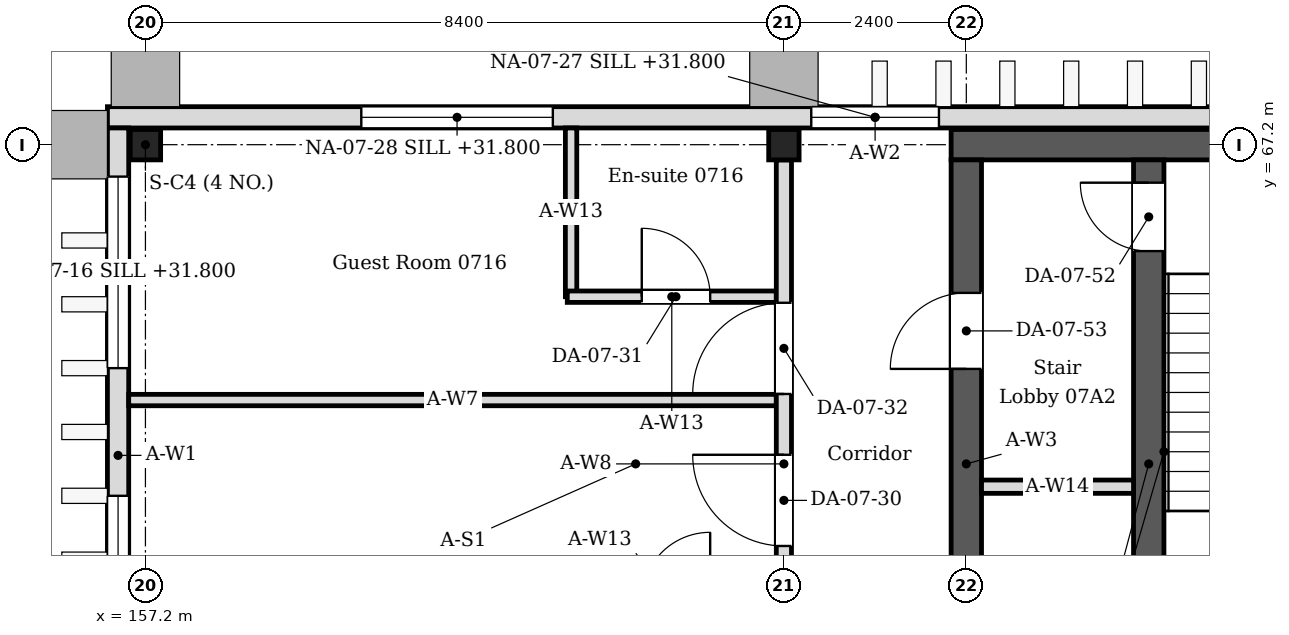
"""IFC4 building model, lengths in metres.
Left out: names, types, materials, properties, quantities, classifications, styles, units other than length and angle.
Written with IfcOpenShell. Run it as: python <this file> out.ifc"""

import sys

from ifc_helpers import new_model, si_unit, direction, frame, frame_2d, origin, origin_2d, place, context, subcontext, project, spatial, rectangle, i_section, extrude, element, fill, save


model = new_model("IFC4")
c1 = context("Model", 3, precision=1e-05, world=origin(), true_north=direction((0.0, 1.0)))
c2 = subcontext(c1, "Body", "Model", "MODEL_VIEW")
j1 = project(units=[si_unit("LENGTHUNIT", "METRE"), si_unit("PLANEANGLEUNIT", "RADIAN")], contexts=[c1])
p1 = place(None, origin())
s1 = spatial("IfcSite", under=j1, at=p1, CompositionType="ELEMENT")
p2 = place(p1, origin())
s2 = spatial("IfcBuilding", under=s1, at=p2, CompositionType="ELEMENT")
p3 = place(p2, frame((0.0, 0.0, 31.2)))
s3 = spatial("IfcBuildingStorey", under=s2, at=p3, CompositionType="ELEMENT", Elevation=31.2)
for number, where, z_axis, x_axis in (
    (1, (157.2, 67.2, 0.0), (0.0, 0.0, 1.0), (1.0, 0.0, 0.0)),
    (2, (165.6, 67.2, 0.0), (0.0, 0.0, 1.0), (1.0, 0.0, 0.0)),
):
    element("IfcColumn", number, at=place(p3, frame(where, z_axis=z_axis, x_axis=x_axis)), inside=s3, PredefinedType="COLUMN", context=c2, shape_type="SweptSolid", body=[
        extrude(i_section(OverallWidth=0.4, OverallDepth=0.4, WebThickness=0.013, FlangeThickness=0.021, FilletRadius=0.022, at=origin_2d()), origin(), (0.0, 0.0, 1.0), 4.2),
    ])
p4 = place(p3, frame((167.8, 67.2, 0.0), z_axis=(0.0, 0.0, 1.0), x_axis=(1.0, 0.0, 0.0)))
e3 = element("IfcWall", 3, at=p4, inside=s3, PredefinedType="SOLIDWALL", context=c2, shape_type="SweptSolid", body=[
    extrude(rectangle(XDim=8.8, YDim=0.4, at=frame_2d((4.4, 0.0))), origin(), (0.0, 0.0, 1.0), 4.05),
])
p5 = place(p3, frame((168.0, 59.0, 0.0), z_axis=(0.0, 0.0, 1.0), x_axis=(0.0, 1.0, 0.0)))
e4 = element("IfcWall", 4, at=p5, inside=s3, PredefinedType="SOLIDWALL", context=c2, shape_type="SweptSolid", body=[
    extrude(rectangle(XDim=8.0, YDim=0.4, at=frame_2d((4.0, 0.0))), origin(), (0.0, 0.0, 1.0), 4.05),
])
p6 = place(p5, frame((5.25, 0.0, 0.0)))
e5 = element("IfcOpeningElement", 5, at=p6, cuts=e4, PredefinedType="OPENING", context=c2, shape_type="SweptSolid", body=[
    extrude(rectangle(XDim=1.0, YDim=2.1, at=frame_2d((0.5, 1.05))), frame((0.0, 0.21, 0.0), z_axis=(0.0, -1.0, 0.0), x_axis=(1.0, 0.0, 0.0)), (0.0, 0.0, 1.0), 0.42),
])
p7 = place(p5, frame((1.275, 0.0, 0.0)))
e6 = element("IfcOpeningElement", 6, at=p7, cuts=e4, PredefinedType="OPENING", context=c2, shape_type="SweptSolid", body=[
    extrude(rectangle(XDim=1.05, YDim=2.1, at=frame_2d((0.525, 1.05))), frame((0.0, 0.21, 0.0), z_axis=(0.0, -1.0, 0.0), x_axis=(1.0, 0.0, 0.0)), (0.0, 0.0, 1.0), 0.42),
])
p8 = place(p3, frame((156.84, 58.45, 0.0), z_axis=(0.0, 0.0, 1.0), x_axis=(0.0, 1.0, 0.0)))
e7 = element("IfcWall", 7, at=p8, inside=s3, PredefinedType="SOLIDWALL", context=c2, shape_type="SweptSolid", body=[
    extrude(rectangle(XDim=8.97, YDim=0.28, at=frame_2d((4.485, 0.0))), origin(), (0.0, 0.0, 1.0), 4.05),
])
p9 = place(p8, frame((1.61, 0.0, 0.6)))
e8 = element("IfcOpeningElement", 8, at=p9, cuts=e7, PredefinedType="OPENING", context=c2, shape_type="SweptSolid", body=[
    extrude(rectangle(XDim=2.52, YDim=2.4, at=frame_2d((1.26, 1.2))), frame((0.0, 0.15, 0.0), z_axis=(0.0, -1.0, 0.0), x_axis=(1.0, 0.0, 0.0)), (0.0, 0.0, 1.0), 0.3),
])
p10 = place(p8, frame((5.81, 0.0, 0.6)))
e9 = element("IfcOpeningElement", 9, at=p10, cuts=e7, PredefinedType="OPENING", context=c2, shape_type="SweptSolid", body=[
    extrude(rectangle(XDim=2.52, YDim=2.4, at=frame_2d((1.26, 1.2))), frame((0.0, 0.15, 0.0), z_axis=(0.0, -1.0, 0.0), x_axis=(1.0, 0.0, 0.0)), (0.0, 0.0, 1.0), 0.3),
])
p11 = place(p3, frame((156.7, 67.56, 0.0), z_axis=(0.0, 0.0, 1.0), x_axis=(1.0, 0.0, 0.0)))
e10 = element("IfcWall", 10, at=p11, inside=s3, PredefinedType="SOLIDWALL", context=c2, shape_type="SweptSolid", body=[
    extrude(rectangle(XDim=20.2, YDim=0.28, at=frame_2d((10.1, 0.0))), origin(), (0.0, 0.0, 1.0), 4.05),
])
p12 = place(p11, frame((9.26, 0.0, 0.6)))
e11 = element("IfcOpeningElement", 11, at=p12, cuts=e10, PredefinedType="OPENING", context=c2, shape_type="SweptSolid", body=[
    extrude(rectangle(XDim=1.68, YDim=2.4, at=frame_2d((0.84, 1.2))), frame((0.0, 0.15, 0.0), z_axis=(0.0, -1.0, 0.0), x_axis=(1.0, 0.0, 0.0)), (0.0, 0.0, 1.0), 0.3),
])
p13 = place(p11, frame((3.34, 0.0, 0.6)))
e12 = element("IfcOpeningElement", 12, at=p13, cuts=e10, PredefinedType="OPENING", context=c2, shape_type="SweptSolid", body=[
    extrude(rectangle(XDim=2.52, YDim=2.4, at=frame_2d((1.26, 1.2))), frame((0.0, 0.15, 0.0), z_axis=(0.0, -1.0, 0.0), x_axis=(1.0, 0.0, 0.0)), (0.0, 0.0, 1.0), 0.3),
])
p14 = place(p3, frame((162.8, 65.2, 0.0), z_axis=(0.0, 0.0, 1.0), x_axis=(0.0, 1.0, 0.0)))
e13 = element("IfcWall", 13, at=p14, inside=s3, PredefinedType="PARTITIONING", context=c2, shape_type="SweptSolid", body=[
    extrude(rectangle(XDim=2.22, YDim=0.15, at=frame_2d((1.11, 0.0))), origin(), (0.0, 0.0, 1.0), 4.05),
])
p15 = place(p3, frame((162.75, 65.2, 0.0), z_axis=(0.0, 0.0, 1.0), x_axis=(1.0, 0.0, 0.0)))
e14 = element("IfcWall", 14, at=p15, inside=s3, PredefinedType="PARTITIONING", context=c2, shape_type="SweptSolid", body=[
    extrude(rectangle(XDim=2.75, YDim=0.15, at=frame_2d((1.375, 0.0))), origin(), (0.0, 0.0, 1.0), 4.05),
])
p16 = place(p15, frame((0.98, 0.0, 0.0)))
e15 = element("IfcOpeningElement", 15, at=p16, cuts=e14, PredefinedType="OPENING", context=c2, shape_type="SweptSolid", body=[
    extrude(rectangle(XDim=0.9, YDim=2.1, at=frame_2d((0.45, 1.05))), frame((0.0, 0.085, 0.0), z_axis=(0.0, -1.0, 0.0), x_axis=(1.0, 0.0, 0.0)), (0.0, 0.0, 1.0), 0.17),
])
p17 = place(p3, frame((156.98, 63.84, 0.0), z_axis=(0.0, 0.0, 1.0), x_axis=(1.0, 0.0, 0.0)))
e16 = element("IfcWall", 16, at=p17, inside=s3, PredefinedType="PARTITIONING", context=c2, shape_type="SweptSolid", body=[
    extrude(rectangle(XDim=8.52, YDim=0.15, at=frame_2d((4.26, 0.0))), origin(), (0.0, 0.0, 1.0), 3.604),
])
p18 = place(p3, frame((165.6, 59.0, 0.0), z_axis=(0.0, 0.0, 1.0), x_axis=(0.0, 1.0, 0.0)))
e17 = element("IfcWall", 17, at=p18, inside=s3, PredefinedType="PARTITIONING", context=c2, shape_type="SweptSolid", body=[
    extrude(rectangle(XDim=8.0, YDim=0.2, at=frame_2d((4.0, 0.0))), origin(), (0.0, 0.0, 1.0), 3.45),
])
p19 = place(p18, frame((2.92, 0.0, 0.0)))
e18 = element("IfcOpeningElement", 18, at=p19, cuts=e17, PredefinedType="OPENING", context=c2, shape_type="SweptSolid", body=[
    extrude(rectangle(XDim=1.2, YDim=2.1, at=frame_2d((0.6, 1.05))), frame((0.0, 0.11, 0.0), z_axis=(0.0, -1.0, 0.0), x_axis=(1.0, 0.0, 0.0)), (0.0, 0.0, 1.0), 0.22),
])
p20 = place(p18, frame((4.92, 0.0, 0.0)))
e19 = element("IfcOpeningElement", 19, at=p20, cuts=e17, PredefinedType="OPENING", context=c2, shape_type="SweptSolid", body=[
    extrude(rectangle(XDim=1.2, YDim=2.1, at=frame_2d((0.6, 1.05))), frame((0.0, 0.11, 0.0), z_axis=(0.0, -1.0, 0.0), x_axis=(1.0, 0.0, 0.0)), (0.0, 0.0, 1.0), 0.22),
])
p21 = place(p3, frame((170.4, 59.0, 0.0), z_axis=(0.0, 0.0, 1.0), x_axis=(0.0, 1.0, 0.0)))
e20 = element("IfcWall", 20, at=p21, inside=s3, PredefinedType="SOLIDWALL", context=c2, shape_type="SweptSolid", body=[
    extrude(rectangle(XDim=8.0, YDim=0.4, at=frame_2d((4.0, 0.0))), origin(), (0.0, 0.0, 1.0), 4.05),
])
p22 = place(p21, frame((6.8, 0.0, 0.0)))
e21 = element("IfcOpeningElement", 21, at=p22, cuts=e20, PredefinedType="OPENING", context=c2, shape_type="SweptSolid", body=[
    extrude(rectangle(XDim=0.9, YDim=2.1, at=frame_2d((0.45, 1.05))), frame((0.0, 0.21, 0.0), z_axis=(0.0, -1.0, 0.0), x_axis=(1.0, 0.0, 0.0)), (0.0, 0.0, 1.0), 0.42),
])
p23 = place(p3, frame((168.2, 62.7, 0.0), z_axis=(0.0, 0.0, 1.0), x_axis=(1.0, 0.0, 0.0)))
e22 = element("IfcWall", 22, at=p23, inside=s3, PredefinedType="PARTITIONING", context=c2, shape_type="SweptSolid", body=[
    extrude(rectangle(XDim=2.0, YDim=0.175, at=frame_2d((1.0, 0.0))), origin(), (0.0, 0.0, 1.0), 4.05),
])
p24 = place(p9, origin())
e23 = element("IfcWindow", 23, at=p24, inside=s3, PartitioningType="SINGLE_PANEL", PredefinedType="WINDOW", context=c2, shape_type="SweptSolid", body=[
    extrude(rectangle(XDim=2.52, YDim=2.4, at=frame_2d((1.26, 1.2))), frame((0.0, 0.03, 0.0), z_axis=(0.0, -1.0, 0.0), x_axis=(1.0, 0.0, 0.0)), (0.0, 0.0, 1.0), 0.06),
])
fill(e8, e23)
p25 = place(p10, origin())
e24 = element("IfcWindow", 24, at=p25, inside=s3, PartitioningType="SINGLE_PANEL", PredefinedType="WINDOW", context=c2, shape_type="SweptSolid", body=[
    extrude(rectangle(XDim=2.52, YDim=2.4, at=frame_2d((1.26, 1.2))), frame((0.0, 0.03, 0.0), z_axis=(0.0, -1.0, 0.0), x_axis=(1.0, 0.0, 0.0)), (0.0, 0.0, 1.0), 0.06),
])
fill(e9, e24)
p26 = place(p12, origin())
e25 = element("IfcWindow", 25, at=p26, inside=s3, PartitioningType="SINGLE_PANEL", PredefinedType="WINDOW", context=c2, shape_type="SweptSolid", body=[
    extrude(rectangle(XDim=1.68, YDim=2.4, at=frame_2d((0.84, 1.2))), frame((0.0, 0.03, 0.0), z_axis=(0.0, -1.0, 0.0), x_axis=(1.0, 0.0, 0.0)), (0.0, 0.0, 1.0), 0.06),
])
fill(e11, e25)
p27 = place(p13, origin())
e26 = element("IfcWindow", 26, at=p27, inside=s3, PartitioningType="SINGLE_PANEL", PredefinedType="WINDOW", context=c2, shape_type="SweptSolid", body=[
    extrude(rectangle(XDim=2.52, YDim=2.4, at=frame_2d((1.26, 1.2))), frame((0.0, 0.03, 0.0), z_axis=(0.0, -1.0, 0.0), x_axis=(1.0, 0.0, 0.0)), (0.0, 0.0, 1.0), 0.06),
])
fill(e12, e26)
p28 = place(p19, origin())
e27 = element("IfcDoor", 27, at=p28, inside=s3, OperationType="SINGLE_SWING_RIGHT", PredefinedType="DOOR", context=c2, shape_type="SweptSolid", body=[
    extrude(rectangle(XDim=1.2, YDim=2.1, at=frame_2d((0.6, 1.05))), frame((0.0, 0.025, 0.0), z_axis=(0.0, -1.0, 0.0), x_axis=(1.0, 0.0, 0.0)), (0.0, 0.0, 1.0), 0.05),
])
fill(e18, e27)
p29 = place(p16, origin())
e28 = element("IfcDoor", 28, at=p29, inside=s3, OperationType="SINGLE_SWING_LEFT", PredefinedType="DOOR", context=c2, shape_type="SweptSolid", body=[
    extrude(rectangle(XDim=0.9, YDim=2.1, at=frame_2d((0.45, 1.05))), frame((0.0, 0.025, 0.0), z_axis=(0.0, -1.0, 0.0), x_axis=(1.0, 0.0, 0.0)), (0.0, 0.0, 1.0), 0.05),
])
fill(e15, e28)
p30 = place(p20, origin())
e29 = element("IfcDoor", 29, at=p30, inside=s3, OperationType="SINGLE_SWING_LEFT", PredefinedType="DOOR", context=c2, shape_type="SweptSolid", body=[
    extrude(rectangle(XDim=1.2, YDim=2.1, at=frame_2d((0.6, 1.05))), frame((0.0, 0.025, 0.0), z_axis=(0.0, -1.0, 0.0), x_axis=(1.0, 0.0, 0.0)), (0.0, 0.0, 1.0), 0.05),
])
fill(e19, e29)
p31 = place(p22, origin())
e30 = element("IfcDoor", 30, at=p31, inside=s3, OperationType="SINGLE_SWING_RIGHT", PredefinedType="DOOR", context=c2, shape_type="SweptSolid", body=[
    extrude(rectangle(XDim=0.9, YDim=2.1, at=frame_2d((0.45, 1.05))), frame((0.0, 0.025, 0.0), z_axis=(0.0, -1.0, 0.0), x_axis=(1.0, 0.0, 0.0)), (0.0, 0.0, 1.0), 0.05),
])
fill(e21, e30)
p32 = place(p6, origin())
e31 = element("IfcDoor", 31, at=p32, inside=s3, OperationType="SINGLE_SWING_LEFT", PredefinedType="DOOR", context=c2, shape_type="SweptSolid", body=[
    extrude(rectangle(XDim=1.0, YDim=2.1, at=frame_2d((0.5, 1.05))), frame((0.0, 0.025, 0.0), z_axis=(0.0, -1.0, 0.0), x_axis=(1.0, 0.0, 0.0)), (0.0, 0.0, 1.0), 0.05),
])
fill(e5, e31)
save(model, sys.argv[1])
